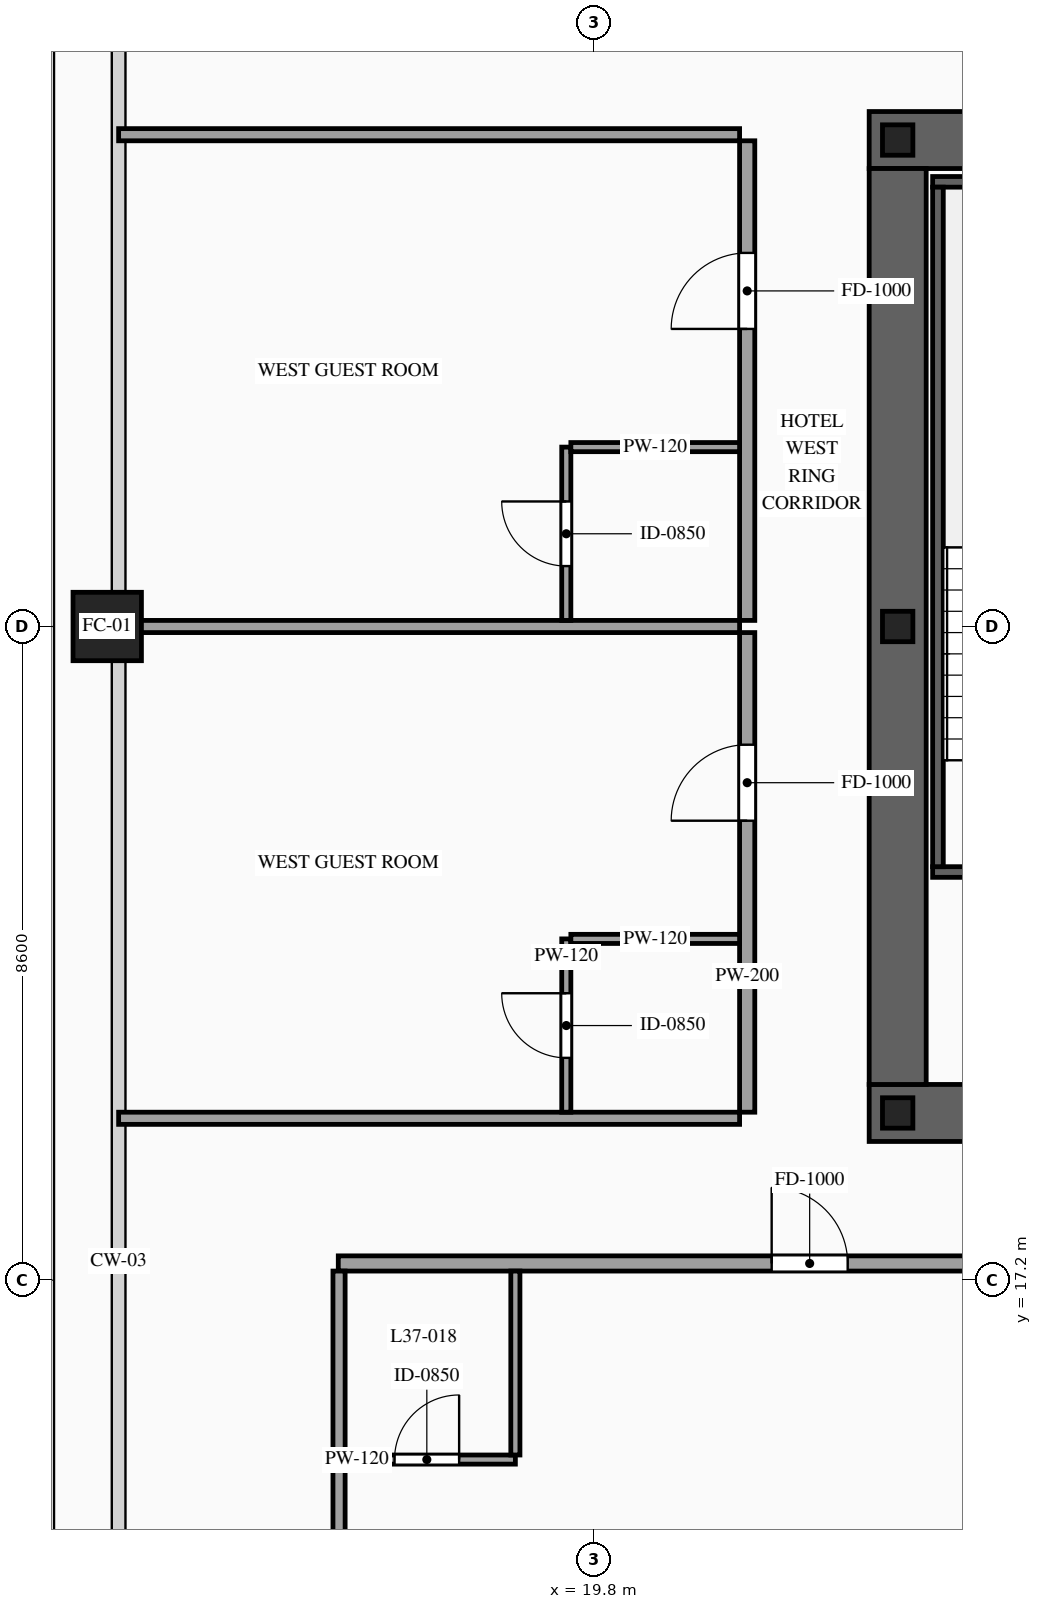
"""IFC4 building model, lengths in metres.
Left out: names, types, materials, properties, quantities, classifications, styles, units other than length and angle.
Written with IfcOpenShell. Run it as: python <this file> out.ifc"""

import sys

from ifc_helpers import new_model, si_unit, direction, frame, frame_2d, origin, origin_2d, place, context, subcontext, project, spatial, rectangle, hollow_rectangle, i_section, extrude, source, transform, mapped, element, fill, save


model = new_model("IFC4")
c1 = context("Model", 3, precision=1e-05, world=origin(), true_north=direction((0.0, 1.0)))
c2 = subcontext(c1, "Body", "Model", "MODEL_VIEW")
j1 = project(units=[si_unit("LENGTHUNIT", "METRE"), si_unit("PLANEANGLEUNIT", "RADIAN")], contexts=[c1])
p1 = place(None, origin())
s1 = spatial("IfcSite", under=j1, at=p1, CompositionType="ELEMENT")
p2 = place(p1, origin())
s2 = spatial("IfcBuilding", under=s1, at=p2, CompositionType="ELEMENT")
p3 = place(p2, frame((0.0, 0.0, 141.6)))
s3 = spatial("IfcBuildingStorey", under=s2, at=p3, CompositionType="ELEMENT", Elevation=141.6)
p4 = place(p3, frame((23.425, 19.4, 0.0), z_axis=(0.0, 0.0, 1.0), x_axis=(1.0, 0.0, 0.0)))
e1 = element("IfcWall", 1, at=p4, inside=s3, PredefinedType="SHEAR", context=c2, shape_type="SweptSolid", body=[
    extrude(rectangle(XDim=27.15, YDim=0.75, at=frame_2d((13.575, 0.0))), origin(), (0.0, 0.0, 1.0), 3.6),
])
p5 = place(p4, frame((2.025, 0.0, 0.0)))
e2 = element("IfcOpeningElement", 2, at=p5, cuts=e1, PredefinedType="OPENING", context=c2, shape_type="SweptSolid", body=[
    extrude(rectangle(XDim=1.1, YDim=2.2, at=frame_2d((0.55, 1.1))), frame((0.0, 0.39, 0.0), z_axis=(0.0, -1.0, 0.0), x_axis=(1.0, 0.0, 0.0)), (0.0, 0.0, 1.0), 0.78),
])
p6 = place(p4, frame((9.925, 0.0, 0.0)))
e3 = element("IfcOpeningElement", 3, at=p6, cuts=e1, PredefinedType="OPENING", context=c2, shape_type="SweptSolid", body=[
    extrude(rectangle(XDim=1.1, YDim=2.2, at=frame_2d((0.55, 1.1))), frame((0.0, 0.39, 0.0), z_axis=(0.0, -1.0, 0.0), x_axis=(1.0, 0.0, 0.0)), (0.0, 0.0, 1.0), 0.78),
])
p7 = place(p4, frame((23.125, 0.0, 0.0)))
e4 = element("IfcOpeningElement", 4, at=p7, cuts=e1, PredefinedType="OPENING", context=c2, shape_type="SweptSolid", body=[
    extrude(rectangle(XDim=1.1, YDim=2.2, at=frame_2d((0.55, 1.1))), frame((0.0, 0.39, 0.0), z_axis=(0.0, -1.0, 0.0), x_axis=(1.0, 0.0, 0.0)), (0.0, 0.0, 1.0), 0.78),
])
p8 = place(p4, frame((19.745, 0.0, 0.0)))
e5 = element("IfcOpeningElement", 5, at=p8, cuts=e1, PredefinedType="OPENING", context=c2, shape_type="SweptSolid", body=[
    extrude(rectangle(XDim=0.9, YDim=2.15, at=frame_2d((0.45, 1.075))), frame((0.0, 0.39, 0.0), z_axis=(0.0, -1.0, 0.0), x_axis=(1.0, 0.0, 0.0)), (0.0, 0.0, 1.0), 0.78),
])
p9 = place(p4, frame((18.305, 0.0, 0.0)))
e6 = element("IfcOpeningElement", 6, at=p9, cuts=e1, PredefinedType="OPENING", context=c2, shape_type="SweptSolid", body=[
    extrude(rectangle(XDim=0.9, YDim=2.15, at=frame_2d((0.45, 1.075))), frame((0.0, 0.39, 0.0), z_axis=(0.0, -1.0, 0.0), x_axis=(1.0, 0.0, 0.0)), (0.0, 0.0, 1.0), 0.78),
])
p10 = place(p3, frame((23.425, 32.2, 0.0), z_axis=(0.0, 0.0, 1.0), x_axis=(1.0, 0.0, 0.0)))
e7 = element("IfcWall", 7, at=p10, inside=s3, PredefinedType="SHEAR", context=c2, shape_type="SweptSolid", body=[
    extrude(rectangle(XDim=27.15, YDim=0.75, at=frame_2d((13.575, 0.0))), origin(), (0.0, 0.0, 1.0), 3.6),
])
p11 = place(p10, frame((4.645, 0.0, 0.0)))
e8 = element("IfcOpeningElement", 8, at=p11, cuts=e7, PredefinedType="OPENING", context=c2, shape_type="SweptSolid", body=[
    extrude(rectangle(XDim=0.9, YDim=2.15, at=frame_2d((0.45, 1.075))), frame((0.0, 0.39, 0.0), z_axis=(0.0, -1.0, 0.0), x_axis=(1.0, 0.0, 0.0)), (0.0, 0.0, 1.0), 0.78),
])
p12 = place(p10, frame((9.925, 0.0, 0.0)))
e9 = element("IfcOpeningElement", 9, at=p12, cuts=e7, PredefinedType="OPENING", context=c2, shape_type="SweptSolid", body=[
    extrude(rectangle(XDim=1.1, YDim=2.2, at=frame_2d((0.55, 1.1))), frame((0.0, 0.39, 0.0), z_axis=(0.0, -1.0, 0.0), x_axis=(1.0, 0.0, 0.0)), (0.0, 0.0, 1.0), 0.78),
])
p13 = place(p10, frame((15.775, 0.0, 0.0)))
e10 = element("IfcOpeningElement", 10, at=p13, cuts=e7, PredefinedType="OPENING", context=c2, shape_type="SweptSolid", body=[
    extrude(rectangle(XDim=1.1, YDim=2.2, at=frame_2d((0.55, 1.1))), frame((0.0, 0.39, 0.0), z_axis=(0.0, -1.0, 0.0), x_axis=(1.0, 0.0, 0.0)), (0.0, 0.0, 1.0), 0.78),
])
p14 = place(p10, frame((18.975, 0.0, 0.0)))
e11 = element("IfcOpeningElement", 11, at=p14, cuts=e7, PredefinedType="OPENING", context=c2, shape_type="SweptSolid", body=[
    extrude(rectangle(XDim=0.9, YDim=2.15, at=frame_2d((0.45, 1.075))), frame((0.0, 0.39, 0.0), z_axis=(0.0, -1.0, 0.0), x_axis=(1.0, 0.0, 0.0)), (0.0, 0.0, 1.0), 0.78),
])
m1 = source(origin(), c2, "Body", "SweptSolid", [
    extrude(rectangle(XDim=12.05, YDim=0.75, at=frame_2d((6.025, 0.0))), origin(), (0.0, 0.0, 1.0), 3.6),
])
p15 = place(p3, frame((23.8, 19.775, 0.0), z_axis=(0.0, 0.0, 1.0), x_axis=(0.0, 1.0, 0.0)))
e12 = element("IfcWall", 12, at=p15, inside=s3, PredefinedType="SHEAR", context=c2, shape_type="MappedRepresentation", body=[
    mapped(m1, transform((0.0, 0.0, 0.0), scale=1.0)),
])
m2 = source(origin(), c2, "Body", "SweptSolid", [
    extrude(i_section(OverallWidth=0.4, OverallDepth=0.4, WebThickness=0.013, FlangeThickness=0.021, at=origin_2d()), origin(), (0.0, 0.0, 1.0), 3.6),
])
for number, where, z_axis, x_axis in (
    (13, (23.8, 19.4, 0.0), (0.0, 0.0, 1.0), (1.0, 0.0, 0.0)),
    (14, (23.8, 25.8, 0.0), (0.0, 0.0, 1.0), (1.0, 0.0, 0.0)),
    (15, (23.8, 32.2, 0.0), (0.0, 0.0, 1.0), (1.0, 0.0, 0.0)),
):
    element("IfcColumn", number, at=place(p3, frame(where, z_axis=z_axis, x_axis=x_axis)), inside=s3, PredefinedType="COLUMN", context=c2, shape_type="MappedRepresentation", body=[
        mapped(m2, transform((0.0, 0.0, 0.0), scale=1.0)),
    ])
m3 = source(origin(), c2, "Body", "SweptSolid", [
    extrude(hollow_rectangle(XDim=0.9, YDim=0.9, WallThickness=0.042, at=origin_2d()), origin(), (0.0, 0.0, 1.0), 3.6),
])
p16 = place(p3, frame((13.4, 25.8, 0.0), z_axis=(0.0, 0.0, 1.0), x_axis=(1.0, 0.0, 0.0)))
e16 = element("IfcColumn", 16, at=p16, inside=s3, PredefinedType="COLUMN", context=c2, shape_type="MappedRepresentation", body=[
    mapped(m3, transform((0.0, 0.0, 0.0), scale=1.0)),
])
p17 = place(p3, frame((24.26, 22.57, 0.0), z_axis=(0.0, 0.0, 1.0), x_axis=(1.0, 0.0, 0.0)))
e17 = element("IfcWall", 17, at=p17, inside=s3, PredefinedType="SOLIDWALL", context=c2, shape_type="SweptSolid", body=[
    extrude(rectangle(XDim=3.28, YDim=0.14, at=frame_2d((1.64, 0.0))), origin(), (0.0, 0.0, 1.0), 3.38),
])
p18 = place(p17, frame((1.09, 0.0, 0.0)))
e18 = element("IfcOpeningElement", 18, at=p18, cuts=e17, PredefinedType="OPENING", context=c2, shape_type="SweptSolid", body=[
    extrude(rectangle(XDim=1.1, YDim=2.2, at=frame_2d((0.55, 1.1))), frame((0.0, 0.085, 0.0), z_axis=(0.0, -1.0, 0.0), x_axis=(1.0, 0.0, 0.0)), (0.0, 0.0, 1.0), 0.17),
])
m4 = source(origin(), c2, "Body", "SweptSolid", [
    extrude(rectangle(XDim=3.28, YDim=0.14, at=frame_2d((1.64, 0.0))), origin(), (0.0, 0.0, 1.0), 3.38),
])
p19 = place(p3, frame((24.26, 31.65, 0.0), z_axis=(0.0, 0.0, 1.0), x_axis=(1.0, 0.0, 0.0)))
e19 = element("IfcWall", 19, at=p19, inside=s3, PredefinedType="SOLIDWALL", context=c2, shape_type="MappedRepresentation", body=[
    mapped(m4, transform((0.0, 0.0, 0.0), scale=1.0)),
])
m5 = source(origin(), c2, "Body", "SweptSolid", [
    extrude(rectangle(XDim=8.94, YDim=0.14, at=frame_2d((4.47, 0.0))), origin(), (0.0, 0.0, 1.0), 3.38),
])
p20 = place(p3, frame((24.33, 22.64, 0.0), z_axis=(0.0, 0.0, 1.0), x_axis=(0.0, 1.0, 0.0)))
e20 = element("IfcWall", 20, at=p20, inside=s3, PredefinedType="SOLIDWALL", context=c2, shape_type="MappedRepresentation", body=[
    mapped(m5, transform((0.0, 0.0, 0.0), scale=1.0)),
])
p21 = place(p3, frame((16.44, 17.42, 0.0), z_axis=(0.0, 0.0, 1.0), x_axis=(1.0, 0.0, 0.0)))
e21 = element("IfcWall", 21, at=p21, inside=s3, PredefinedType="PARTITIONING", context=c2, shape_type="SweptSolid", body=[
    extrude(rectangle(XDim=9.994, YDim=0.2, at=frame_2d((4.997, 0.0))), origin(), (0.0, 0.0, 1.0), 3.38),
])
p22 = place(p21, frame((5.702, 0.0, 0.0)))
e22 = element("IfcOpeningElement", 22, at=p22, cuts=e21, PredefinedType="OPENING", context=c2, shape_type="SweptSolid", body=[
    extrude(rectangle(XDim=1.0, YDim=2.2, at=frame_2d((0.5, 1.1))), frame((0.0, 0.115, 0.0), z_axis=(0.0, -1.0, 0.0), x_axis=(1.0, 0.0, 0.0)), (0.0, 0.0, 1.0), 0.23),
])
p23 = place(p3, frame((16.44, 14.84, 0.0), z_axis=(0.0, 0.0, 1.0), x_axis=(1.0, 0.0, 0.0)))
e23 = element("IfcWall", 23, at=p23, inside=s3, PredefinedType="PARTITIONING", context=c2, shape_type="SweptSolid", body=[
    extrude(rectangle(XDim=2.33, YDim=0.12, at=frame_2d((1.165, 0.0))), origin(), (0.0, 0.0, 1.0), 3.38),
])
p24 = place(p23, frame((0.74, 0.0, 0.0)))
e24 = element("IfcOpeningElement", 24, at=p24, cuts=e23, PredefinedType="OPENING", context=c2, shape_type="SweptSolid", body=[
    extrude(rectangle(XDim=0.85, YDim=2.1, at=frame_2d((0.425, 1.05))), frame((0.0, 0.075, 0.0), z_axis=(0.0, -1.0, 0.0), x_axis=(1.0, 0.0, 0.0)), (0.0, 0.0, 1.0), 0.15),
])
m6 = source(origin(), c2, "Body", "SweptSolid", [
    extrude(rectangle(XDim=2.42, YDim=0.12, at=frame_2d((1.21, 0.0))), origin(), (0.0, 0.0, 1.0), 3.38),
])
p25 = place(p3, frame((18.77, 14.9, 0.0), z_axis=(0.0, 0.0, 1.0), x_axis=(0.0, 1.0, 0.0)))
e25 = element("IfcWall", 25, at=p25, inside=s3, PredefinedType="PARTITIONING", context=c2, shape_type="MappedRepresentation", body=[
    mapped(m6, transform((0.0, 0.0, 0.0), scale=1.0)),
])
m7 = source(origin(), c2, "Body", "SweptSolid", [
    extrude(rectangle(XDim=14.82, YDim=0.16, at=frame_2d((7.41, 0.0))), origin(), (0.0, 0.0, 1.0), 3.38),
])
p26 = place(p3, frame((16.45, 2.5, 0.0), z_axis=(0.0, 0.0, 1.0), x_axis=(0.0, 1.0, 0.0)))
e26 = element("IfcWall", 26, at=p26, inside=s3, PredefinedType="PARTITIONING", context=c2, shape_type="MappedRepresentation", body=[
    mapped(m7, transform((0.0, 0.0, 0.0), scale=1.0)),
])
p27 = place(p3, frame((21.82, 19.41, 0.0), z_axis=(0.0, 0.0, 1.0), x_axis=(0.0, 1.0, 0.0)))
e27 = element("IfcWall", 27, at=p27, inside=s3, PredefinedType="PARTITIONING", context=c2, shape_type="SweptSolid", body=[
    extrude(rectangle(XDim=6.31, YDim=0.2, at=frame_2d((3.155, 0.0))), origin(), (0.0, 0.0, 1.0), 3.38),
])
p28 = place(p27, frame((3.835, 0.0, 0.0)))
e28 = element("IfcOpeningElement", 28, at=p28, cuts=e27, PredefinedType="OPENING", context=c2, shape_type="SweptSolid", body=[
    extrude(rectangle(XDim=1.0, YDim=2.2, at=frame_2d((0.5, 1.1))), frame((0.0, 0.115, 0.0), z_axis=(0.0, -1.0, 0.0), x_axis=(1.0, 0.0, 0.0)), (0.0, 0.0, 1.0), 0.23),
])
m8 = source(origin(), c2, "Body", "SweptSolid", [
    extrude(rectangle(XDim=8.17, YDim=0.16, at=frame_2d((4.085, 0.0))), origin(), (0.0, 0.0, 1.0), 2.675),
])
p29 = place(p3, frame((13.55, 25.8, 0.0), z_axis=(0.0, 0.0, 1.0), x_axis=(1.0, 0.0, 0.0)))
e29 = element("IfcWall", 29, at=p29, inside=s3, PredefinedType="PARTITIONING", context=c2, shape_type="MappedRepresentation", body=[
    mapped(m8, transform((0.0, 0.0, 0.0), scale=1.0)),
])
m9 = source(origin(), c2, "Body", "SweptSolid", [
    extrude(rectangle(XDim=8.17, YDim=0.16, at=frame_2d((4.085, 0.0))), origin(), (0.0, 0.0, 1.0), 2.875),
])
p30 = place(p3, frame((13.55, 19.33, 0.0), z_axis=(0.0, 0.0, 1.0), x_axis=(1.0, 0.0, 0.0)))
e30 = element("IfcWall", 30, at=p30, inside=s3, PredefinedType="PARTITIONING", context=c2, shape_type="MappedRepresentation", body=[
    mapped(m9, transform((0.0, 0.0, 0.0), scale=1.0)),
])
p31 = place(p3, frame((19.44, 19.41, 0.0), z_axis=(0.0, 0.0, 1.0), x_axis=(0.0, 1.0, 0.0)))
e31 = element("IfcWall", 31, at=p31, inside=s3, PredefinedType="PARTITIONING", context=c2, shape_type="SweptSolid", body=[
    extrude(rectangle(XDim=2.28, YDim=0.12, at=frame_2d((1.14, 0.0))), origin(), (0.0, 0.0, 1.0), 3.38),
])
p32 = place(p31, frame((0.715, 0.0, 0.0)))
e32 = element("IfcOpeningElement", 32, at=p32, cuts=e31, PredefinedType="OPENING", context=c2, shape_type="SweptSolid", body=[
    extrude(rectangle(XDim=0.85, YDim=2.1, at=frame_2d((0.425, 1.05))), frame((0.0, 0.075, 0.0), z_axis=(0.0, -1.0, 0.0), x_axis=(1.0, 0.0, 0.0)), (0.0, 0.0, 1.0), 0.15),
])
m10 = source(origin(), c2, "Body", "SweptSolid", [
    extrude(rectangle(XDim=2.22, YDim=0.12, at=frame_2d((1.11, 0.0))), origin(), (0.0, 0.0, 1.0), 3.38),
])
p33 = place(p3, frame((19.5, 21.69, 0.0), z_axis=(0.0, 0.0, 1.0), x_axis=(1.0, 0.0, 0.0)))
e33 = element("IfcWall", 33, at=p33, inside=s3, PredefinedType="PARTITIONING", context=c2, shape_type="MappedRepresentation", body=[
    mapped(m10, transform((0.0, 0.0, 0.0), scale=1.0)),
])
p34 = place(p3, frame((21.82, 25.88, 0.0), z_axis=(0.0, 0.0, 1.0), x_axis=(0.0, 1.0, 0.0)))
e34 = element("IfcWall", 34, at=p34, inside=s3, PredefinedType="PARTITIONING", context=c2, shape_type="SweptSolid", body=[
    extrude(rectangle(XDim=6.31, YDim=0.2, at=frame_2d((3.155, 0.0))), origin(), (0.0, 0.0, 1.0), 3.38),
])
p35 = place(p34, frame((3.835, 0.0, 0.0)))
e35 = element("IfcOpeningElement", 35, at=p35, cuts=e34, PredefinedType="OPENING", context=c2, shape_type="SweptSolid", body=[
    extrude(rectangle(XDim=1.0, YDim=2.2, at=frame_2d((0.5, 1.1))), frame((0.0, 0.115, 0.0), z_axis=(0.0, -1.0, 0.0), x_axis=(1.0, 0.0, 0.0)), (0.0, 0.0, 1.0), 0.23),
])
p36 = place(p3, frame((13.55, 32.27, 0.0), z_axis=(0.0, 0.0, 1.0), x_axis=(1.0, 0.0, 0.0)))
e36 = element("IfcWall", 36, at=p36, inside=s3, PredefinedType="PARTITIONING", context=c2, shape_type="MappedRepresentation", body=[
    mapped(m9, transform((0.0, 0.0, 0.0), scale=1.0)),
])
p37 = place(p3, frame((19.44, 25.88, 0.0), z_axis=(0.0, 0.0, 1.0), x_axis=(0.0, 1.0, 0.0)))
e37 = element("IfcWall", 37, at=p37, inside=s3, PredefinedType="PARTITIONING", context=c2, shape_type="SweptSolid", body=[
    extrude(rectangle(XDim=2.28, YDim=0.12, at=frame_2d((1.14, 0.0))), origin(), (0.0, 0.0, 1.0), 3.38),
])
p38 = place(p37, frame((0.715, 0.0, 0.0)))
e38 = element("IfcOpeningElement", 38, at=p38, cuts=e37, PredefinedType="OPENING", context=c2, shape_type="SweptSolid", body=[
    extrude(rectangle(XDim=0.85, YDim=2.1, at=frame_2d((0.425, 1.05))), frame((0.0, 0.075, 0.0), z_axis=(0.0, -1.0, 0.0), x_axis=(1.0, 0.0, 0.0)), (0.0, 0.0, 1.0), 0.15),
])
p39 = place(p3, frame((19.5, 28.16, 0.0), z_axis=(0.0, 0.0, 1.0), x_axis=(1.0, 0.0, 0.0)))
e39 = element("IfcWall", 39, at=p39, inside=s3, PredefinedType="PARTITIONING", context=c2, shape_type="MappedRepresentation", body=[
    mapped(m10, transform((0.0, 0.0, 0.0), scale=1.0)),
])
m11 = source(origin(), c2, "Body", "SweptSolid", [
    extrude(rectangle(XDim=1.0, YDim=2.2, at=frame_2d((0.5, 1.1))), frame((0.0, 0.025, 0.0), z_axis=(0.0, -1.0, 0.0), x_axis=(1.0, 0.0, 0.0)), (0.0, 0.0, 1.0), 0.05),
])
p40 = place(p22, origin())
e40 = element("IfcDoor", 40, at=p40, inside=s3, OperationType="SINGLE_SWING_LEFT", PredefinedType="DOOR", context=c2, shape_type="MappedRepresentation", body=[
    mapped(m11, transform((0.0, 0.0, 0.0), scale=1.0)),
])
fill(e22, e40)
m12 = source(origin(), c2, "Body", "SweptSolid", [
    extrude(rectangle(XDim=0.85, YDim=2.1, at=frame_2d((0.425, 1.05))), frame((0.0, 0.025, 0.0), z_axis=(0.0, -1.0, 0.0), x_axis=(1.0, 0.0, 0.0)), (0.0, 0.0, 1.0), 0.05),
])
p41 = place(p24, origin())
e41 = element("IfcDoor", 41, at=p41, inside=s3, OperationType="SINGLE_SWING_RIGHT", PredefinedType="DOOR", context=c2, shape_type="MappedRepresentation", body=[
    mapped(m12, transform((0.0, 0.0, 0.0), scale=1.0)),
])
fill(e24, e41)
p42 = place(p28, origin())
e42 = element("IfcDoor", 42, at=p42, inside=s3, OperationType="SINGLE_SWING_LEFT", PredefinedType="DOOR", context=c2, shape_type="MappedRepresentation", body=[
    mapped(m11, transform((0.0, 0.0, 0.0), scale=1.0)),
])
fill(e28, e42)
p43 = place(p32, origin())
e43 = element("IfcDoor", 43, at=p43, inside=s3, OperationType="SINGLE_SWING_RIGHT", PredefinedType="DOOR", context=c2, shape_type="MappedRepresentation", body=[
    mapped(m12, transform((0.0, 0.0, 0.0), scale=1.0)),
])
fill(e32, e43)
p44 = place(p35, origin())
e44 = element("IfcDoor", 44, at=p44, inside=s3, OperationType="SINGLE_SWING_LEFT", PredefinedType="DOOR", context=c2, shape_type="MappedRepresentation", body=[
    mapped(m11, transform((0.0, 0.0, 0.0), scale=1.0)),
])
fill(e35, e44)
p45 = place(p38, origin())
e45 = element("IfcDoor", 45, at=p45, inside=s3, OperationType="SINGLE_SWING_RIGHT", PredefinedType="DOOR", context=c2, shape_type="MappedRepresentation", body=[
    mapped(m12, transform((0.0, 0.0, 0.0), scale=1.0)),
])
fill(e38, e45)
save(model, sys.argv[1])
